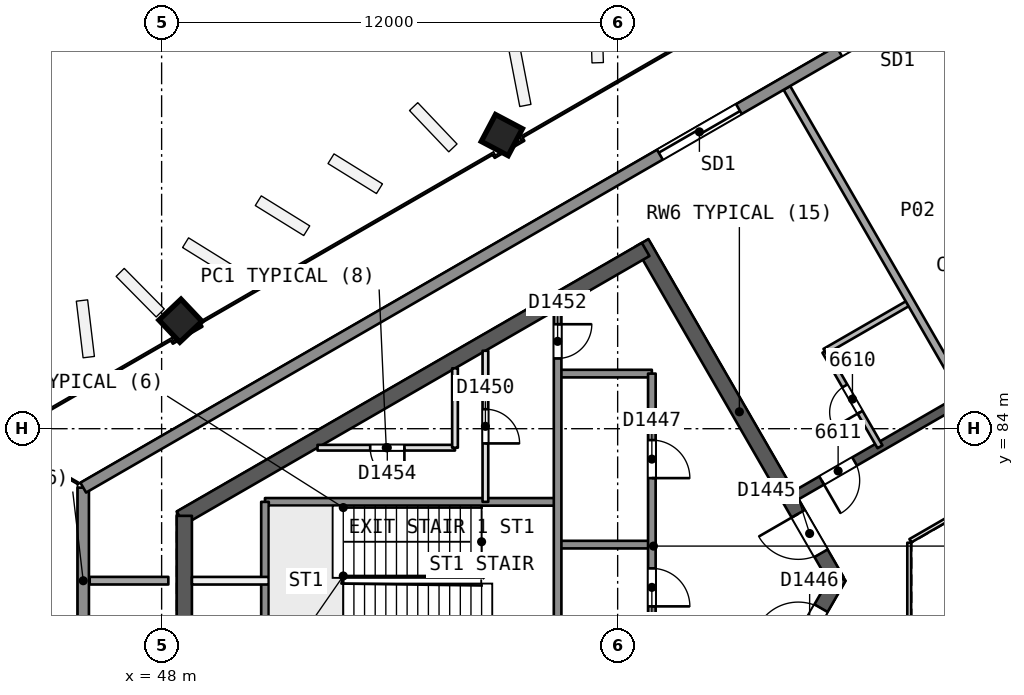
"""IFC4 building model, lengths in metres.
Left out: names, types, materials, properties, quantities, classifications, styles, units other than length and angle.
Written with IfcOpenShell. Run it as: python <this file> out.ifc"""

import sys

from ifc_helpers import new_model, si_unit, direction, frame, frame_2d, origin, origin_2d, place, context, subcontext, project, spatial, rectangle, extrude, element, fill, save


model = new_model("IFC4")
c1 = context("Model", 3, precision=1e-05, world=origin(), true_north=direction((0.0, 1.0)))
c2 = subcontext(c1, "Body", "Model", "MODEL_VIEW")
j1 = project(units=[si_unit("LENGTHUNIT", "METRE"), si_unit("PLANEANGLEUNIT", "RADIAN")], contexts=[c1])
p1 = place(None, origin())
s1 = spatial("IfcSite", under=j1, at=p1, CompositionType="ELEMENT")
p2 = place(p1, origin())
s2 = spatial("IfcBuilding", under=s1, at=p2, CompositionType="ELEMENT")
p3 = place(p2, frame((0.0, 0.0, 270.1)))
s3 = spatial("IfcBuildingStorey", under=s2, at=p3, CompositionType="ELEMENT", Elevation=270.1)
p4 = place(p3, frame((65.769, 80.0, 0.0), z_axis=(0.0, 0.0, 1.0), x_axis=(-0.50000177223, 0.866024380585, 0.0)))
e1 = element("IfcWall", 1, at=p4, inside=s3, PredefinedType="SHEAR", context=c2, shape_type="SweptSolid", body=[
    extrude(rectangle(XDim=10.265, YDim=0.4, at=frame_2d((5.132, 0.0))), origin(), (0.0, 0.0, 1.0), 3.7),
])
p5 = place(p4, frame((0.834, 0.0, 0.0)))
e2 = element("IfcOpeningElement", 2, at=p5, cuts=e1, PredefinedType="OPENING", context=c2, shape_type="SweptSolid", body=[
    extrude(rectangle(XDim=1.2, YDim=2.1, at=frame_2d((0.6, 1.05))), frame((0.0, 0.21, 0.0), z_axis=(0.0, -1.0, 0.0), x_axis=(1.0, 0.0, 0.0)), (0.0, 0.0, 1.0), 0.421),
])
p6 = place(p3, frame((60.737, 88.716, 0.0), z_axis=(0.0, 0.0, 1.0), x_axis=(-0.866028812667, -0.499994095595, 0.0)))
e3 = element("IfcWall", 3, at=p6, inside=s3, PredefinedType="SHEAR", context=c2, shape_type="SweptSolid", body=[
    extrude(rectangle(XDim=14.134, YDim=0.4, at=frame_2d((7.067, 0.0))), origin(), (0.0, 0.0, 1.0), 3.7),
])
p7 = place(p3, frame((48.597, 81.707, 0.0), z_axis=(0.0, 0.0, 1.0), x_axis=(0.0, -1.0, 0.0)))
e4 = element("IfcWall", 4, at=p7, inside=s3, PredefinedType="SHEAR", context=c2, shape_type="SweptSolid", body=[
    extrude(rectangle(XDim=3.53, YDim=0.4, at=frame_2d((1.765, 0.0))), origin(), (0.0, 0.0, 1.0), 3.7),
])
p8 = place(p3, frame((60.737, 71.284, 0.0), z_axis=(0.0, 0.0, 1.0), x_axis=(0.50000547566, 0.866022242388, 0.0)))
e5 = element("IfcWall", 5, at=p8, inside=s3, PredefinedType="SHEAR", context=c2, shape_type="SweptSolid", body=[
    extrude(rectangle(XDim=10.18, YDim=0.4, at=frame_2d((5.09, 0.0))), origin(), (0.0, 0.0, 1.0), 3.7),
])
p9 = place(p8, frame((8.03, 0.0, 0.0)))
e6 = element("IfcOpeningElement", 6, at=p9, cuts=e5, PredefinedType="OPENING", context=c2, shape_type="SweptSolid", body=[
    extrude(rectangle(XDim=1.2, YDim=2.1, at=frame_2d((0.6, 1.05))), frame((0.0, 0.21, 0.0), z_axis=(0.0, -1.0, 0.0), x_axis=(1.0, 0.0, 0.0)), (0.0, 0.0, 1.0), 0.421),
])
p10 = place(p3, frame((78.2, 90.046, 0.0), z_axis=(0.0, 0.0, 1.0), x_axis=(-0.866026492143, -0.499998114903, 0.0)))
e7 = element("IfcWall", 7, at=p10, inside=s3, PredefinedType="SHEAR", context=c2, shape_type="SweptSolid", body=[
    extrude(rectangle(XDim=15.588, YDim=0.25, at=frame_2d((7.794, 0.0))), origin(), (0.0, 0.0, 1.0), 3.3),
])
p11 = place(p10, frame((7.072, 0.0, 0.0)))
e8 = element("IfcOpeningElement", 8, at=p11, cuts=e7, PredefinedType="OPENING", context=c2, shape_type="SweptSolid", body=[
    extrude(rectangle(XDim=1.0, YDim=2.1, at=frame_2d((0.5, 1.05))), frame((0.0, 0.135, 0.0), z_axis=(0.0, -1.0, 0.0), x_axis=(1.0, 0.0, 0.0)), (0.0, 0.0, 1.0), 0.271),
])
p12 = place(p10, frame((13.816, 0.0, 0.0)))
e9 = element("IfcOpeningElement", 9, at=p12, cuts=e7, PredefinedType="OPENING", context=c2, shape_type="SweptSolid", body=[
    extrude(rectangle(XDim=1.0, YDim=2.1, at=frame_2d((0.5, 1.05))), frame((0.0, 0.135, 0.0), z_axis=(0.0, -1.0, 0.0), x_axis=(1.0, 0.0, 0.0)), (0.0, 0.0, 1.0), 0.271),
])
p13 = place(p3, frame((56.929, 91.74, 0.0), z_axis=(0.019328516974, -0.012138044789, 0.999739504221), x_axis=(-0.500205614953, 0.865671455024, 0.020181048691)))
e10 = element("IfcColumn", 10, at=p13, inside=s3, PredefinedType="COLUMN", context=c2, shape_type="SweptSolid", body=[
    extrude(rectangle(XDim=0.8, YDim=0.8, at=origin_2d()), origin(), (0.0, 0.0, 1.0), 3.701),
])
p14 = place(p3, frame((48.46, 86.851, 0.0), z_axis=(0.028559101991, -0.006859460986, 0.999568569678), x_axis=(-0.498513358127, 0.866646856607, 0.020190534949)))
e11 = element("IfcColumn", 11, at=p14, inside=s3, PredefinedType="COLUMN", context=c2, shape_type="SweptSolid", body=[
    extrude(rectangle(XDim=0.8, YDim=0.8, at=origin_2d()), origin(), (0.0, 0.0, 1.0), 3.702),
])
p15 = place(p3, frame((64.453, 92.968, 0.0), z_axis=(0.0, 0.0, 1.0), x_axis=(0.500006368596, -0.866021726843, 0.0)))
e12 = element("IfcWall", 12, at=p15, inside=s3, PredefinedType="PARTITIONING", context=c2, shape_type="SweptSolid", body=[
    extrude(rectangle(XDim=9.404, YDim=0.2, at=frame_2d((4.702, 0.0))), origin(), (0.0, 0.0, 1.0), 3.3),
])
p16 = place(p3, frame((66.903, 83.524, 0.0), z_axis=(0.0, 0.0, 1.0), x_axis=(-0.499987231761, 0.866032775405, 0.0)))
e13 = element("IfcWall", 13, at=p16, inside=s3, PredefinedType="PARTITIONING", context=c2, shape_type="SweptSolid", body=[
    extrude(rectangle(XDim=2.9, YDim=0.15, at=frame_2d((1.45, 0.0))), origin(), (0.0, 0.0, 1.0), 3.3),
])
p17 = place(p16, frame((1.05, 0.0, 0.0)))
e14 = element("IfcOpeningElement", 14, at=p17, cuts=e13, PredefinedType="OPENING", context=c2, shape_type="SweptSolid", body=[
    extrude(rectangle(XDim=0.8, YDim=2.1, at=frame_2d((0.4, 1.05))), frame((0.0, 0.085, 0.0), z_axis=(0.0, -1.0, 0.0), x_axis=(1.0, 0.0, 0.0)), (0.0, 0.0, 1.0), 0.171),
])
p18 = place(p3, frame((65.453, 86.035, 0.0), z_axis=(0.0, 0.0, 1.0), x_axis=(0.866021400173, 0.500006934395, 0.0)))
e15 = element("IfcWall", 15, at=p18, inside=s3, PredefinedType="PARTITIONING", context=c2, shape_type="SweptSolid", body=[
    extrude(rectangle(XDim=2.6, YDim=0.15, at=frame_2d((1.3, 0.0))), origin(), (0.0, 0.0, 1.0), 3.3),
])
p19 = place(p3, frame((46.107, 80.001, 0.0), z_axis=(0.0, 0.0, 1.0), x_axis=(1.0, 0.0, 0.0)))
e16 = element("IfcWall", 16, at=p19, inside=s3, PredefinedType="PARTITIONING", context=c2, shape_type="SweptSolid", body=[
    extrude(rectangle(XDim=2.07, YDim=0.2, at=frame_2d((1.035, 0.0))), origin(), (0.0, 0.0, 1.0), 3.3),
])
p20 = place(p3, frame((45.937, 77.551, 0.0), z_axis=(0.0, 0.0, 1.0), x_axis=(0.0, 1.0, 0.0)))
e17 = element("IfcWall", 17, at=p20, inside=s3, PredefinedType="SOLIDWALL", context=c2, shape_type="SweptSolid", body=[
    extrude(rectangle(XDim=4.898, YDim=0.3, at=frame_2d((2.449, 0.0))), origin(), (0.0, 0.0, 1.0), 3.3),
])
p21 = place(p3, frame((45.937, 82.449, 0.0), z_axis=(0.0, 0.0, 1.0), x_axis=(0.866026235966, 0.499998558616, 0.0)))
e18 = element("IfcWall", 18, at=p21, inside=s3, PredefinedType="SOLIDWALL", context=c2, shape_type="SweptSolid", body=[
    extrude(rectangle(XDim=47.889, YDim=0.3, at=frame_2d((23.945, 0.0))), origin(), (0.0, 0.0, 1.0), 3.3),
])
p22 = place(p21, frame((38.957, 0.0, 0.9)))
e19 = element("IfcOpeningElement", 19, at=p22, cuts=e18, PredefinedType="OPENING", context=c2, shape_type="SweptSolid", body=[
    extrude(rectangle(XDim=1.8, YDim=1.5, at=frame_2d((0.9, 0.75))), frame((0.0, 0.161, 0.0), z_axis=(0.0, -1.0, 0.0), x_axis=(1.0, 0.0, 0.0)), (0.0, 0.0, 1.0), 0.321),
])
p23 = place(p21, frame((28.189, 0.0, 0.0)))
e20 = element("IfcOpeningElement", 20, at=p23, cuts=e18, PredefinedType="OPENING", context=c2, shape_type="SweptSolid", body=[
    extrude(rectangle(XDim=2.4, YDim=2.4, at=frame_2d((1.2, 1.2))), frame((0.0, 0.161, 0.0), z_axis=(0.0, -1.0, 0.0), x_axis=(1.0, 0.0, 0.0)), (0.0, 0.0, 1.0), 0.321),
])
p24 = place(p21, frame((22.967, 0.0, 0.0)))
e21 = element("IfcOpeningElement", 21, at=p24, cuts=e18, PredefinedType="OPENING", context=c2, shape_type="SweptSolid", body=[
    extrude(rectangle(XDim=2.4, YDim=2.4, at=frame_2d((1.2, 1.2))), frame((0.0, 0.161, 0.0), z_axis=(0.0, -1.0, 0.0), x_axis=(1.0, 0.0, 0.0)), (0.0, 0.0, 1.0), 0.321),
])
p25 = place(p21, frame((17.522, 0.0, 0.0)))
e22 = element("IfcOpeningElement", 22, at=p25, cuts=e18, PredefinedType="OPENING", context=c2, shape_type="SweptSolid", body=[
    extrude(rectangle(XDim=2.4, YDim=2.4, at=frame_2d((1.2, 1.2))), frame((0.0, 0.161, 0.0), z_axis=(0.0, -1.0, 0.0), x_axis=(1.0, 0.0, 0.0)), (0.0, 0.0, 1.0), 0.321),
])
p26 = place(p3, frame((60.9, 85.45, 0.0), z_axis=(0.0, 0.0, 1.0), x_axis=(-1.0, 0.0, 0.0)))
e23 = element("IfcWall", 23, at=p26, inside=s3, PredefinedType="SOLIDWALL", context=c2, shape_type="SweptSolid", body=[
    extrude(rectangle(XDim=2.48, YDim=0.2, at=frame_2d((1.24, 0.0))), origin(), (0.0, 0.0, 1.0), 3.3),
])
p27 = place(p3, frame((55.72, 83.5, 0.0), z_axis=(0.0, 0.0, 1.0), x_axis=(-1.0, 0.0, 0.0)))
e24 = element("IfcWall", 24, at=p27, inside=s3, PredefinedType="PARTITIONING", context=c2, shape_type="SweptSolid", body=[
    extrude(rectangle(XDim=3.618, YDim=0.15, at=frame_2d((1.809, 0.0))), origin(), (0.0, 0.0, 1.0), 3.3),
])
p28 = place(p27, frame((1.332, 0.0, 0.0)))
e25 = element("IfcOpeningElement", 25, at=p28, cuts=e24, PredefinedType="OPENING", context=c2, shape_type="SweptSolid", body=[
    extrude(rectangle(XDim=0.9, YDim=2.1, at=frame_2d((0.45, 1.05))), frame((0.0, 0.085, 0.0), z_axis=(0.0, -1.0, 0.0), x_axis=(1.0, 0.0, 0.0)), (0.0, 0.0, 1.0), 0.171),
])
p29 = place(p3, frame((58.42, 82.075, 0.0), z_axis=(0.0, 0.0, 1.0), x_axis=(-1.0, 0.0, 0.0)))
e26 = element("IfcWall", 26, at=p29, inside=s3, PredefinedType="SOLIDWALL", context=c2, shape_type="SweptSolid", body=[
    extrude(rectangle(XDim=7.7, YDim=0.2, at=frame_2d((3.85, 0.0))), origin(), (0.0, 0.0, 1.0), 3.3),
])
p30 = place(p3, frame((60.9, 80.95, 0.0), z_axis=(0.0, 0.0, 1.0), x_axis=(-1.0, 0.0, 0.0)))
e27 = element("IfcWall", 27, at=p30, inside=s3, PredefinedType="SOLIDWALL", context=c2, shape_type="SweptSolid", body=[
    extrude(rectangle(XDim=2.48, YDim=0.2, at=frame_2d((1.24, 0.0))), origin(), (0.0, 0.0, 1.0), 3.3),
])
p31 = place(p3, frame((50.82, 80.0, 0.0), z_axis=(0.0, 0.0, 1.0), x_axis=(-1.0, 0.0, 0.0)))
e28 = element("IfcWall", 28, at=p31, inside=s3, PredefinedType="PARTITIONING", context=c2, shape_type="SweptSolid", body=[
    extrude(rectangle(XDim=2.023, YDim=0.2, at=frame_2d((1.012, 0.0))), origin(), (0.0, 0.0, 1.0), 3.3),
])
p32 = place(p3, frame((60.9, 85.45, 0.0), z_axis=(0.0, 0.0, 1.0), x_axis=(0.0, -1.0, 0.0)))
e29 = element("IfcWall", 29, at=p32, inside=s3, PredefinedType="SOLIDWALL", context=c2, shape_type="SweptSolid", body=[
    extrude(rectangle(XDim=10.9, YDim=0.2, at=frame_2d((5.45, 0.0))), origin(), (0.0, 0.0, 1.0), 3.3),
])
p33 = place(p32, frame((1.75, 0.0, 0.0)))
e30 = element("IfcOpeningElement", 30, at=p33, cuts=e29, PredefinedType="OPENING", context=c2, shape_type="SweptSolid", body=[
    extrude(rectangle(XDim=1.0, YDim=2.1, at=frame_2d((0.5, 1.05))), frame((0.0, 0.11, 0.0), z_axis=(0.0, -1.0, 0.0), x_axis=(1.0, 0.0, 0.0)), (0.0, 0.0, 1.0), 0.221),
])
p34 = place(p32, frame((5.125, 0.0, 0.0)))
e31 = element("IfcOpeningElement", 31, at=p34, cuts=e29, PredefinedType="OPENING", context=c2, shape_type="SweptSolid", body=[
    extrude(rectangle(XDim=1.0, YDim=2.1, at=frame_2d((0.5, 1.05))), frame((0.0, 0.11, 0.0), z_axis=(0.0, -1.0, 0.0), x_axis=(1.0, 0.0, 0.0)), (0.0, 0.0, 1.0), 0.221),
])
p35 = place(p32, frame((7.375, 0.0, 0.0)))
e32 = element("IfcOpeningElement", 32, at=p35, cuts=e29, PredefinedType="OPENING", context=c2, shape_type="SweptSolid", body=[
    extrude(rectangle(XDim=1.0, YDim=2.1, at=frame_2d((0.5, 1.05))), frame((0.0, 0.11, 0.0), z_axis=(0.0, -1.0, 0.0), x_axis=(1.0, 0.0, 0.0)), (0.0, 0.0, 1.0), 0.221),
])
p36 = place(p3, frame((58.42, 87.148, 0.0), z_axis=(0.0, 0.0, 1.0), x_axis=(0.0, -1.0, 0.0)))
e33 = element("IfcWall", 33, at=p36, inside=s3, PredefinedType="SOLIDWALL", context=c2, shape_type="SweptSolid", body=[
    extrude(rectangle(XDim=10.698, YDim=0.2, at=frame_2d((5.349, 0.0))), origin(), (0.0, 0.0, 1.0), 3.3),
])
p37 = place(p36, frame((0.399, 0.0, 0.0)))
e34 = element("IfcOpeningElement", 34, at=p37, cuts=e33, PredefinedType="OPENING", context=c2, shape_type="SweptSolid", body=[
    extrude(rectangle(XDim=0.9, YDim=2.1, at=frame_2d((0.45, 1.05))), frame((0.0, 0.11, 0.0), z_axis=(0.0, -1.0, 0.0), x_axis=(1.0, 0.0, 0.0)), (0.0, 0.0, 1.0), 0.221),
])
p38 = place(p3, frame((56.52, 86.051, 0.0), z_axis=(0.0, 0.0, 1.0), x_axis=(0.0, -1.0, 0.0)))
e35 = element("IfcWall", 35, at=p38, inside=s3, PredefinedType="PARTITIONING", context=c2, shape_type="SweptSolid", body=[
    extrude(rectangle(XDim=3.976, YDim=0.15, at=frame_2d((1.988, 0.0))), origin(), (0.0, 0.0, 1.0), 3.3),
])
p39 = place(p38, frame((1.538, 0.0, 0.0)))
e36 = element("IfcOpeningElement", 36, at=p39, cuts=e35, PredefinedType="OPENING", context=c2, shape_type="SweptSolid", body=[
    extrude(rectangle(XDim=0.9, YDim=2.1, at=frame_2d((0.45, 1.05))), frame((0.0, 0.085, 0.0), z_axis=(0.0, -1.0, 0.0), x_axis=(1.0, 0.0, 0.0)), (0.0, 0.0, 1.0), 0.171),
])
p40 = place(p3, frame((55.72, 85.589, 0.0), z_axis=(0.0, 0.0, 1.0), x_axis=(0.0, -1.0, 0.0)))
e37 = element("IfcWall", 37, at=p40, inside=s3, PredefinedType="PARTITIONING", context=c2, shape_type="SweptSolid", body=[
    extrude(rectangle(XDim=2.089, YDim=0.15, at=frame_2d((1.044, 0.0))), origin(), (0.0, 0.0, 1.0), 3.3),
])
p41 = place(p3, frame((50.72, 82.075, 0.0), z_axis=(0.0, 0.0, 1.0), x_axis=(0.0, -1.0, 0.0)))
e38 = element("IfcWall", 38, at=p41, inside=s3, PredefinedType="SOLIDWALL", context=c2, shape_type="SweptSolid", body=[
    extrude(rectangle(XDim=4.15, YDim=0.2, at=frame_2d((2.075, 0.0))), origin(), (0.0, 0.0, 1.0), 3.3),
])
p42 = place(p3, frame((77.738, 86.846, 0.0), z_axis=(0.0, 0.0, 1.0), x_axis=(-0.866026658274, -0.499997827154, 0.0)))
e39 = element("IfcWall", 39, at=p42, inside=s3, PredefinedType="PARTITIONING", context=c2, shape_type="SweptSolid", body=[
    extrude(rectangle(XDim=11.588, YDim=0.1, at=frame_2d((5.794, 0.0))), origin(), (0.0, 0.0, 1.0), 3.3),
])
p43 = place(p3, frame((67.672, 81.0, 0.0), z_axis=(0.0, 0.0, 1.0), x_axis=(0.0, -1.0, 0.0)))
e40 = element("IfcWall", 40, at=p43, inside=s3, PredefinedType="PARTITIONING", context=c2, shape_type="SweptSolid", body=[
    extrude(rectangle(XDim=2.0, YDim=0.1, at=frame_2d((1.0, 0.0))), origin(), (0.0, 0.0, 1.0), 3.3),
])
p44 = place(p17, origin())
e41 = element("IfcDoor", 41, at=p44, inside=s3, OperationType="SINGLE_SWING_LEFT", PredefinedType="NOTDEFINED", context=c2, shape_type="SweptSolid", body=[
    extrude(rectangle(XDim=0.8, YDim=2.1, at=frame_2d((0.4, 1.05))), frame((0.0, 0.025, 0.0), z_axis=(0.0, -1.0, 0.0), x_axis=(1.0, 0.0, 0.0)), (0.0, 0.0, 1.0), 0.05),
])
fill(e14, e41)
p45 = place(p12, origin())
e42 = element("IfcDoor", 42, at=p45, inside=s3, OperationType="SINGLE_SWING_RIGHT", PredefinedType="NOTDEFINED", context=c2, shape_type="SweptSolid", body=[
    extrude(rectangle(XDim=1.0, YDim=2.1, at=frame_2d((0.5, 1.05))), frame((0.0, 0.025, 0.0), z_axis=(0.0, -1.0, 0.0), x_axis=(1.0, 0.0, 0.0)), (0.0, 0.0, 1.0), 0.05),
])
fill(e9, e42)
p46 = place(p24, origin())
e43 = element("IfcDoor", 43, at=p46, inside=s3, OperationType="SLIDING_TO_RIGHT", PredefinedType="NOTDEFINED", context=c2, shape_type="SweptSolid", body=[
    extrude(rectangle(XDim=2.4, YDim=2.4, at=frame_2d((1.2, 1.2))), frame((0.0, 0.025, 0.0), z_axis=(0.0, -1.0, 0.0), x_axis=(1.0, 0.0, 0.0)), (0.0, 0.0, 1.0), 0.05),
])
fill(e21, e43)
p47 = place(p25, origin())
e44 = element("IfcDoor", 44, at=p47, inside=s3, OperationType="SLIDING_TO_LEFT", PredefinedType="NOTDEFINED", context=c2, shape_type="SweptSolid", body=[
    extrude(rectangle(XDim=2.4, YDim=2.4, at=frame_2d((1.2, 1.2))), frame((0.0, 0.025, 0.0), z_axis=(0.0, -1.0, 0.0), x_axis=(1.0, 0.0, 0.0)), (0.0, 0.0, 1.0), 0.05),
])
fill(e22, e44)
p48 = place(p5, origin())
e45 = element("IfcDoor", 45, at=p48, inside=s3, OperationType="SINGLE_SWING_RIGHT", PredefinedType="NOTDEFINED", context=c2, shape_type="SweptSolid", body=[
    extrude(rectangle(XDim=1.2, YDim=2.1, at=frame_2d((0.6, 1.05))), frame((0.0, 0.025, 0.0), z_axis=(0.0, -1.0, 0.0), x_axis=(1.0, 0.0, 0.0)), (0.0, 0.0, 1.0), 0.05),
])
fill(e2, e45)
p49 = place(p9, origin())
e46 = element("IfcDoor", 46, at=p49, inside=s3, OperationType="SINGLE_SWING_LEFT", PredefinedType="NOTDEFINED", context=c2, shape_type="SweptSolid", body=[
    extrude(rectangle(XDim=1.2, YDim=2.1, at=frame_2d((0.6, 1.05))), frame((0.0, 0.025, 0.0), z_axis=(0.0, -1.0, 0.0), x_axis=(1.0, 0.0, 0.0)), (0.0, 0.0, 1.0), 0.05),
])
fill(e6, e46)
p50 = place(p33, origin())
e47 = element("IfcDoor", 47, at=p50, inside=s3, OperationType="SINGLE_SWING_RIGHT", PredefinedType="NOTDEFINED", context=c2, shape_type="SweptSolid", body=[
    extrude(rectangle(XDim=1.0, YDim=2.1, at=frame_2d((0.5, 1.05))), frame((0.0, 0.025, 0.0), z_axis=(0.0, -1.0, 0.0), x_axis=(1.0, 0.0, 0.0)), (0.0, 0.0, 1.0), 0.05),
])
fill(e30, e47)
p51 = place(p34, origin())
e48 = element("IfcDoor", 48, at=p51, inside=s3, OperationType="SINGLE_SWING_RIGHT", PredefinedType="NOTDEFINED", context=c2, shape_type="SweptSolid", body=[
    extrude(rectangle(XDim=1.0, YDim=2.1, at=frame_2d((0.5, 1.05))), frame((0.0, 0.025, 0.0), z_axis=(0.0, -1.0, 0.0), x_axis=(1.0, 0.0, 0.0)), (0.0, 0.0, 1.0), 0.05),
])
fill(e31, e48)
p52 = place(p39, origin())
e49 = element("IfcDoor", 49, at=p52, inside=s3, OperationType="SINGLE_SWING_RIGHT", PredefinedType="NOTDEFINED", context=c2, shape_type="SweptSolid", body=[
    extrude(rectangle(XDim=0.9, YDim=2.1, at=frame_2d((0.45, 1.05))), frame((0.0, 0.025, 0.0), z_axis=(0.0, -1.0, 0.0), x_axis=(1.0, 0.0, 0.0)), (0.0, 0.0, 1.0), 0.05),
])
fill(e36, e49)
p53 = place(p37, origin())
e50 = element("IfcDoor", 50, at=p53, inside=s3, OperationType="SINGLE_SWING_LEFT", PredefinedType="NOTDEFINED", context=c2, shape_type="SweptSolid", body=[
    extrude(rectangle(XDim=0.9, YDim=2.1, at=frame_2d((0.45, 1.05))), frame((0.0, 0.025, 0.0), z_axis=(0.0, -1.0, 0.0), x_axis=(1.0, 0.0, 0.0)), (0.0, 0.0, 1.0), 0.05),
])
fill(e34, e50)
p54 = place(p28, origin())
e51 = element("IfcDoor", 51, at=p54, inside=s3, OperationType="SINGLE_SWING_LEFT", PredefinedType="NOTDEFINED", context=c2, shape_type="SweptSolid", body=[
    extrude(rectangle(XDim=0.9, YDim=2.1, at=frame_2d((0.45, 1.05))), frame((0.0, 0.025, 0.0), z_axis=(0.0, -1.0, 0.0), x_axis=(1.0, 0.0, 0.0)), (0.0, 0.0, 1.0), 0.05),
])
fill(e25, e51)
save(model, sys.argv[1])
